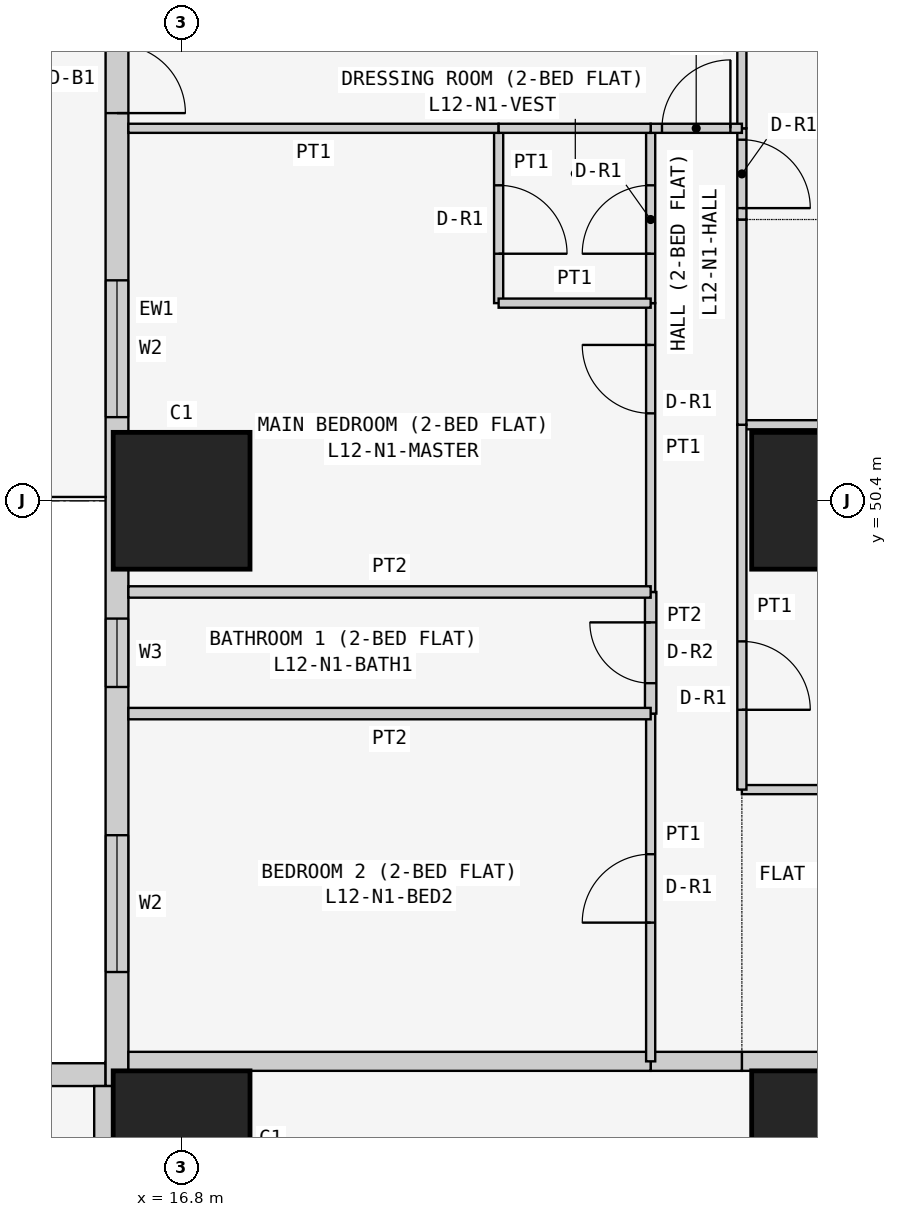
"""IFC4 building model, lengths in metres.
Left out: names, types, materials, properties, quantities, classifications, styles, units other than length and angle.
Written with IfcOpenShell. Run it as: python <this file> out.ifc"""

import sys

from ifc_helpers import new_model, si_unit, direction, frame, frame_2d, origin, origin_2d, place, context, subcontext, project, spatial, rectangle, extrude, element, fill, save


model = new_model("IFC4")
c1 = context("Model", 3, precision=1e-05, world=origin(), true_north=direction((0.0, 1.0)))
c2 = subcontext(c1, "Body", "Model", "MODEL_VIEW")
j1 = project(units=[si_unit("LENGTHUNIT", "METRE"), si_unit("PLANEANGLEUNIT", "RADIAN")], contexts=[c1])
p1 = place(None, origin())
s1 = spatial("IfcSite", under=j1, at=p1, CompositionType="ELEMENT")
p2 = place(p1, origin())
s2 = spatial("IfcBuilding", under=s1, at=p2, CompositionType="ELEMENT")
p3 = place(p2, frame((0.0, 0.0, 52.5)))
s3 = spatial("IfcBuildingStorey", under=s2, at=p3, CompositionType="ELEMENT", Elevation=52.5)
for number, where, z_axis, x_axis in (
    (1, (16.8, 42.0, 0.0), (0.0, 0.0, 1.0), (1.0, 0.0, 0.0)),
    (2, (16.8, 50.4, 0.0), (0.0, 0.0, 1.0), (1.0, 0.0, 0.0)),
    (3, (25.2, 42.0, 0.0), (0.0, 0.0, 1.0), (1.0, 0.0, 0.0)),
    (4, (25.2, 50.4, 0.0), (0.0, 0.0, 1.0), (1.0, 0.0, 0.0)),
):
    element("IfcColumn", number, at=place(p3, frame(where, z_axis=z_axis, x_axis=x_axis)), inside=s3, PredefinedType="COLUMN", context=c2, shape_type="SweptSolid", body=[
        extrude(rectangle(XDim=1.8, YDim=1.8, at=origin_2d()), origin(), (0.0, 0.0, 1.0), 3.6),
    ])
p4 = place(p3, frame((15.8, 42.85, 0.0), z_axis=(0.0, 0.0, 1.0), x_axis=(-1.0, 0.0, 0.0)))
e5 = element("IfcWall", 5, at=p4, inside=s3, PredefinedType="SOLIDWALL", context=c2, shape_type="SweptSolid", body=[
    extrude(rectangle(XDim=15.4, YDim=0.3, at=frame_2d((7.7, 0.0))), origin(), (0.0, 0.0, 1.0), 3.45),
])
p5 = place(p4, frame((1.2, 0.0, 0.9)))
e6 = element("IfcOpeningElement", 6, at=p5, cuts=e5, PredefinedType="OPENING", context=c2, shape_type="SweptSolid", body=[
    extrude(rectangle(XDim=1.8, YDim=1.5, at=frame_2d((0.9, 0.75))), frame((0.0, 0.16, 0.0), z_axis=(0.0, -1.0, 0.0), x_axis=(1.0, 0.0, 0.0)), (0.0, 0.0, 1.0), 0.32),
])
p6 = place(p4, frame((4.95, 0.0, 1.5)))
e7 = element("IfcOpeningElement", 7, at=p6, cuts=e5, PredefinedType="OPENING", context=c2, shape_type="SweptSolid", body=[
    extrude(rectangle(XDim=0.9, YDim=0.7, at=frame_2d((0.45, 0.35))), frame((0.0, 0.16, 0.0), z_axis=(0.0, -1.0, 0.0), x_axis=(1.0, 0.0, 0.0)), (0.0, 0.0, 1.0), 0.32),
])
p7 = place(p4, frame((8.5, 0.0, 0.9)))
e8 = element("IfcOpeningElement", 8, at=p7, cuts=e5, PredefinedType="OPENING", context=c2, shape_type="SweptSolid", body=[
    extrude(rectangle(XDim=1.8, YDim=1.5, at=frame_2d((0.9, 0.75))), frame((0.0, 0.16, 0.0), z_axis=(0.0, -1.0, 0.0), x_axis=(1.0, 0.0, 0.0)), (0.0, 0.0, 1.0), 0.32),
])
p8 = place(p4, frame((12.5, 0.0, 0.0)))
e9 = element("IfcOpeningElement", 9, at=p8, cuts=e5, PredefinedType="OPENING", context=c2, shape_type="SweptSolid", body=[
    extrude(rectangle(XDim=0.9, YDim=2.4, at=frame_2d((0.45, 1.2))), frame((0.0, 0.16, 0.0), z_axis=(0.0, -1.0, 0.0), x_axis=(1.0, 0.0, 0.0)), (0.0, 0.0, 1.0), 0.32),
])
p9 = place(p4, frame((13.5, 0.0, 0.9)))
e10 = element("IfcOpeningElement", 10, at=p9, cuts=e5, PredefinedType="OPENING", context=c2, shape_type="SweptSolid", body=[
    extrude(rectangle(XDim=1.2, YDim=1.5, at=frame_2d((0.6, 0.75))), frame((0.0, 0.16, 0.0), z_axis=(0.0, -1.0, 0.0), x_axis=(1.0, 0.0, 0.0)), (0.0, 0.0, 1.0), 0.32),
])
p10 = place(p3, frame((15.95, 58.4, 0.0), z_axis=(0.0, 0.0, 1.0), x_axis=(0.0, -1.0, 0.0)))
e11 = element("IfcWall", 11, at=p10, inside=s3, PredefinedType="SOLIDWALL", context=c2, shape_type="SweptSolid", body=[
    extrude(rectangle(XDim=15.7, YDim=0.3, at=frame_2d((7.85, 0.0))), origin(), (0.0, 0.0, 1.0), 3.45),
])
p11 = place(p10, frame((12.4, 0.0, 0.9)))
e12 = element("IfcOpeningElement", 12, at=p11, cuts=e11, PredefinedType="OPENING", context=c2, shape_type="SweptSolid", body=[
    extrude(rectangle(XDim=1.8, YDim=1.5, at=frame_2d((0.9, 0.75))), frame((0.0, 0.16, 0.0), z_axis=(0.0, -1.0, 0.0), x_axis=(1.0, 0.0, 0.0)), (0.0, 0.0, 1.0), 0.32),
])
p12 = place(p10, frame((9.55, 0.0, 1.5)))
e13 = element("IfcOpeningElement", 13, at=p12, cuts=e11, PredefinedType="OPENING", context=c2, shape_type="SweptSolid", body=[
    extrude(rectangle(XDim=0.9, YDim=0.7, at=frame_2d((0.45, 0.35))), frame((0.0, 0.16, 0.0), z_axis=(0.0, -1.0, 0.0), x_axis=(1.0, 0.0, 0.0)), (0.0, 0.0, 1.0), 0.32),
])
p13 = place(p10, frame((5.1, 0.0, 0.9)))
e14 = element("IfcOpeningElement", 14, at=p13, cuts=e11, PredefinedType="OPENING", context=c2, shape_type="SweptSolid", body=[
    extrude(rectangle(XDim=1.8, YDim=1.5, at=frame_2d((0.9, 0.75))), frame((0.0, 0.16, 0.0), z_axis=(0.0, -1.0, 0.0), x_axis=(1.0, 0.0, 0.0)), (0.0, 0.0, 1.0), 0.32),
])
p14 = place(p10, frame((2.0, 0.0, 0.0)))
e15 = element("IfcOpeningElement", 15, at=p14, cuts=e11, PredefinedType="OPENING", context=c2, shape_type="SweptSolid", body=[
    extrude(rectangle(XDim=0.9, YDim=2.4, at=frame_2d((0.45, 1.2))), frame((0.0, 0.16, 0.0), z_axis=(0.0, -1.0, 0.0), x_axis=(1.0, 0.0, 0.0)), (0.0, 0.0, 1.0), 0.32),
])
p15 = place(p10, frame((0.7, 0.0, 0.9)))
e16 = element("IfcOpeningElement", 16, at=p15, cuts=e11, PredefinedType="OPENING", context=c2, shape_type="SweptSolid", body=[
    extrude(rectangle(XDim=1.2, YDim=1.5, at=frame_2d((0.6, 0.75))), frame((0.0, 0.16, 0.0), z_axis=(0.0, -1.0, 0.0), x_axis=(1.0, 0.0, 0.0)), (0.0, 0.0, 1.0), 0.32),
])
p16 = place(p3, frame((24.171, 43.025, 0.0), z_axis=(0.0, 0.0, 1.0), x_axis=(1.0, 0.0, 0.0)))
e17 = element("IfcWall", 17, at=p16, inside=s3, PredefinedType="PARTITIONING", context=c2, shape_type="SweptSolid", body=[
    extrude(rectangle(XDim=5.229, YDim=0.25, at=frame_2d((2.615, 0.0))), origin(), (0.0, 0.0, 1.0), 3.45),
])
p17 = place(p16, frame((2.129, 0.0, 0.0)))
e18 = element("IfcOpeningElement", 18, at=p17, cuts=e17, PredefinedType="OPENING", context=c2, shape_type="SweptSolid", body=[
    extrude(rectangle(XDim=1.0, YDim=2.1, at=frame_2d((0.5, 1.05))), frame((0.0, 0.135, 0.0), z_axis=(0.0, -1.0, 0.0), x_axis=(1.0, 0.0, 0.0)), (0.0, 0.0, 1.0), 0.27),
])
p18 = place(p3, frame((22.971, 43.025, 0.0), z_axis=(0.0, 0.0, 1.0), x_axis=(1.0, 0.0, 0.0)))
e19 = element("IfcWall", 19, at=p18, inside=s3, PredefinedType="PARTITIONING", context=c2, shape_type="SweptSolid", body=[
    extrude(rectangle(XDim=1.2, YDim=0.25, at=frame_2d((0.6, 0.0))), origin(), (0.0, 0.0, 1.0), 3.45),
])
for number, where, z_axis, x_axis in (
    (20, (16.1, 43.025, 0.0), (0.0, 0.0, 1.0), (1.0, 0.0, 0.0)),
    (21, (15.775, 35.829, 0.0), (0.0, 0.0, 1.0), (0.0, 1.0, 0.0)),
):
    element("IfcWall", number, at=place(p3, frame(where, z_axis=z_axis, x_axis=x_axis)), inside=s3, PredefinedType="PARTITIONING", context=c2, shape_type="SweptSolid", body=[
        extrude(rectangle(XDim=6.871, YDim=0.25, at=frame_2d((3.436, 0.0))), origin(), (0.0, 0.0, 1.0), 3.45),
    ])
for number, where, z_axis, x_axis in (
    (22, (29.4, 46.6, 0.0), (0.0, 0.0, 1.0), (-1.0, 0.0, 0.0)),
    (23, (29.4, 51.4, 0.0), (0.0, 0.0, 1.0), (-1.0, 0.0, 0.0)),
):
    element("IfcWall", number, at=place(p3, frame(where, z_axis=z_axis, x_axis=x_axis)), inside=s3, PredefinedType="PARTITIONING", context=c2, shape_type="SweptSolid", body=[
        extrude(rectangle(XDim=5.229, YDim=0.12, at=frame_2d((2.615, 0.0))), origin(), (0.0, 0.0, 1.0), 3.45),
    ])
p19 = place(p3, frame((24.171, 51.4, 0.0), z_axis=(0.0, 0.0, 1.0), x_axis=(0.0, -1.0, 0.0)))
e24 = element("IfcWall", 24, at=p19, inside=s3, PredefinedType="PARTITIONING", context=c2, shape_type="SweptSolid", body=[
    extrude(rectangle(XDim=4.8, YDim=0.12, at=frame_2d((2.4, 0.0))), origin(), (0.0, 0.0, 1.0), 3.45),
])
p20 = place(p19, frame((2.85, 0.0, 0.0)))
e25 = element("IfcOpeningElement", 25, at=p20, cuts=e24, PredefinedType="OPENING", context=c2, shape_type="SweptSolid", body=[
    extrude(rectangle(XDim=0.9, YDim=2.1, at=frame_2d((0.45, 1.05))), frame((0.0, 0.07, 0.0), z_axis=(0.0, -1.0, 0.0), x_axis=(1.0, 0.0, 0.0)), (0.0, 0.0, 1.0), 0.14),
])
p21 = place(p3, frame((24.171, 54.1, 0.0), z_axis=(0.0, 0.0, 1.0), x_axis=(0.0, -1.0, 0.0)))
e26 = element("IfcWall", 26, at=p21, inside=s3, PredefinedType="PARTITIONING", context=c2, shape_type="SweptSolid", body=[
    extrude(rectangle(XDim=2.7, YDim=0.12, at=frame_2d((1.35, 0.0))), origin(), (0.0, 0.0, 1.0), 3.45),
])
p22 = place(p3, frame((24.171, 55.3, 0.0), z_axis=(0.0, 0.0, 1.0), x_axis=(0.0, -1.0, 0.0)))
e27 = element("IfcWall", 27, at=p22, inside=s3, PredefinedType="PARTITIONING", context=c2, shape_type="SweptSolid", body=[
    extrude(rectangle(XDim=1.2, YDim=0.12, at=frame_2d((0.6, 0.0))), origin(), (0.0, 0.0, 1.0), 3.45),
])
p23 = place(p22, frame((0.15, 0.0, 0.0)))
e28 = element("IfcOpeningElement", 28, at=p23, cuts=e27, PredefinedType="OPENING", context=c2, shape_type="SweptSolid", body=[
    extrude(rectangle(XDim=0.9, YDim=2.1, at=frame_2d((0.45, 1.05))), frame((0.0, 0.07, 0.0), z_axis=(0.0, -1.0, 0.0), x_axis=(1.0, 0.0, 0.0)), (0.0, 0.0, 1.0), 0.14),
])
p24 = place(p3, frame((24.171, 59.45, 0.0), z_axis=(0.0, 0.0, 1.0), x_axis=(0.0, -1.0, 0.0)))
e29 = element("IfcWall", 29, at=p24, inside=s3, PredefinedType="PARTITIONING", context=c2, shape_type="SweptSolid", body=[
    extrude(rectangle(XDim=4.15, YDim=0.12, at=frame_2d((2.075, 0.0))), origin(), (0.0, 0.0, 1.0), 3.45),
])
p25 = place(p3, frame((22.971, 47.6, 0.0), z_axis=(0.0, 0.0, 1.0), x_axis=(0.0, -1.0, 0.0)))
e30 = element("IfcWall", 30, at=p25, inside=s3, PredefinedType="PARTITIONING", context=c2, shape_type="SweptSolid", body=[
    extrude(rectangle(XDim=4.575, YDim=0.12, at=frame_2d((2.288, 0.0))), origin(), (0.0, 0.0, 1.0), 3.45),
])
p26 = place(p25, frame((1.85, 0.0, 0.0)))
e31 = element("IfcOpeningElement", 31, at=p26, cuts=e30, PredefinedType="OPENING", context=c2, shape_type="SweptSolid", body=[
    extrude(rectangle(XDim=0.9, YDim=2.1, at=frame_2d((0.45, 1.05))), frame((0.0, 0.07, 0.0), z_axis=(0.0, -1.0, 0.0), x_axis=(1.0, 0.0, 0.0)), (0.0, 0.0, 1.0), 0.14),
])
p27 = place(p3, frame((22.971, 49.2, 0.0), z_axis=(0.0, 0.0, 1.0), x_axis=(0.0, -1.0, 0.0)))
e32 = element("IfcWall", 32, at=p27, inside=s3, PredefinedType="PARTITIONING", context=c2, shape_type="SweptSolid", body=[
    extrude(rectangle(XDim=1.6, YDim=0.15, at=frame_2d((0.8, 0.0))), origin(), (0.0, 0.0, 1.0), 3.45),
])
p28 = place(p27, frame((0.4, 0.0, 0.0)))
e33 = element("IfcOpeningElement", 33, at=p28, cuts=e32, PredefinedType="OPENING", context=c2, shape_type="SweptSolid", body=[
    extrude(rectangle(XDim=0.8, YDim=2.1, at=frame_2d((0.4, 1.05))), frame((0.0, 0.085, 0.0), z_axis=(0.0, -1.0, 0.0), x_axis=(1.0, 0.0, 0.0)), (0.0, 0.0, 1.0), 0.17),
])
p29 = place(p3, frame((22.971, 53.0, 0.0), z_axis=(0.0, 0.0, 1.0), x_axis=(0.0, -1.0, 0.0)))
e34 = element("IfcWall", 34, at=p29, inside=s3, PredefinedType="PARTITIONING", context=c2, shape_type="SweptSolid", body=[
    extrude(rectangle(XDim=3.8, YDim=0.12, at=frame_2d((1.9, 0.0))), origin(), (0.0, 0.0, 1.0), 3.45),
])
p30 = place(p29, frame((0.55, 0.0, 0.0)))
e35 = element("IfcOpeningElement", 35, at=p30, cuts=e34, PredefinedType="OPENING", context=c2, shape_type="SweptSolid", body=[
    extrude(rectangle(XDim=0.9, YDim=2.1, at=frame_2d((0.45, 1.05))), frame((0.0, 0.07, 0.0), z_axis=(0.0, -1.0, 0.0), x_axis=(1.0, 0.0, 0.0)), (0.0, 0.0, 1.0), 0.14),
])
p31 = place(p3, frame((22.971, 55.3, 0.0), z_axis=(0.0, 0.0, 1.0), x_axis=(0.0, -1.0, 0.0)))
e36 = element("IfcWall", 36, at=p31, inside=s3, PredefinedType="PARTITIONING", context=c2, shape_type="SweptSolid", body=[
    extrude(rectangle(XDim=2.3, YDim=0.12, at=frame_2d((1.15, 0.0))), origin(), (0.0, 0.0, 1.0), 3.45),
])
p32 = place(p31, frame((0.75, 0.0, 0.0)))
e37 = element("IfcOpeningElement", 37, at=p32, cuts=e36, PredefinedType="OPENING", context=c2, shape_type="SweptSolid", body=[
    extrude(rectangle(XDim=0.9, YDim=2.1, at=frame_2d((0.45, 1.05))), frame((0.0, 0.07, 0.0), z_axis=(0.0, -1.0, 0.0), x_axis=(1.0, 0.0, 0.0)), (0.0, 0.0, 1.0), 0.14),
])
p33 = place(p3, frame((24.171, 55.3, 0.0), z_axis=(0.0, 0.0, 1.0), x_axis=(-1.0, 0.0, 0.0)))
e38 = element("IfcWall", 38, at=p33, inside=s3, PredefinedType="PARTITIONING", context=c2, shape_type="SweptSolid", body=[
    extrude(rectangle(XDim=1.2, YDim=0.12, at=frame_2d((0.6, 0.0))), origin(), (0.0, 0.0, 1.0), 3.45),
])
p34 = place(p33, frame((0.151, 0.0, 0.0)))
e39 = element("IfcOpeningElement", 39, at=p34, cuts=e38, PredefinedType="OPENING", context=c2, shape_type="SweptSolid", body=[
    extrude(rectangle(XDim=0.9, YDim=2.1, at=frame_2d((0.45, 1.05))), frame((0.0, 0.07, 0.0), z_axis=(0.0, -1.0, 0.0), x_axis=(1.0, 0.0, 0.0)), (0.0, 0.0, 1.0), 0.14),
])
for number, where, z_axis, x_axis in (
    (40, (22.971, 47.6, 0.0), (0.0, 0.0, 1.0), (-1.0, 0.0, 0.0)),
    (41, (22.971, 49.2, 0.0), (0.0, 0.0, 1.0), (-1.0, 0.0, 0.0)),
):
    element("IfcWall", number, at=place(p3, frame(where, z_axis=z_axis, x_axis=x_axis)), inside=s3, PredefinedType="PARTITIONING", context=c2, shape_type="SweptSolid", body=[
        extrude(rectangle(XDim=6.871, YDim=0.15, at=frame_2d((3.436, 0.0))), origin(), (0.0, 0.0, 1.0), 3.45),
    ])
p35 = place(p3, frame((20.971, 55.3, 0.0), z_axis=(0.0, 0.0, 1.0), x_axis=(0.0, -1.0, 0.0)))
e42 = element("IfcWall", 42, at=p35, inside=s3, PredefinedType="PARTITIONING", context=c2, shape_type="SweptSolid", body=[
    extrude(rectangle(XDim=2.3, YDim=0.12, at=frame_2d((1.15, 0.0))), origin(), (0.0, 0.0, 1.0), 2.848),
])
p36 = place(p35, frame((0.75, 0.0, 0.0)))
e43 = element("IfcOpeningElement", 43, at=p36, cuts=e42, PredefinedType="OPENING", context=c2, shape_type="SweptSolid", body=[
    extrude(rectangle(XDim=0.9, YDim=2.1, at=frame_2d((0.45, 1.05))), frame((0.0, 0.07, 0.0), z_axis=(0.0, -1.0, 0.0), x_axis=(1.0, 0.0, 0.0)), (0.0, 0.0, 1.0), 0.14),
])
p37 = place(p3, frame((20.971, 53.0, 0.0), z_axis=(0.0, 0.0, 1.0), x_axis=(1.0, 0.0, 0.0)))
e44 = element("IfcWall", 44, at=p37, inside=s3, PredefinedType="PARTITIONING", context=c2, shape_type="SweptSolid", body=[
    extrude(rectangle(XDim=2.0, YDim=0.12, at=frame_2d((1.0, 0.0))), origin(), (0.0, 0.0, 1.0), 3.45),
])
p38 = place(p3, frame((16.1, 55.3, 0.0), z_axis=(0.0, 0.0, 1.0), x_axis=(1.0, 0.0, 0.0)))
e45 = element("IfcWall", 45, at=p38, inside=s3, PredefinedType="PARTITIONING", context=c2, shape_type="SweptSolid", body=[
    extrude(rectangle(XDim=4.871, YDim=0.12, at=frame_2d((2.436, 0.0))), origin(), (0.0, 0.0, 1.0), 3.45),
])
p39 = place(p3, frame((22.971, 55.3, 0.0), z_axis=(0.0, 0.0, 1.0), x_axis=(-1.0, 0.0, 0.0)))
e46 = element("IfcWall", 46, at=p39, inside=s3, PredefinedType="PARTITIONING", context=c2, shape_type="SweptSolid", body=[
    extrude(rectangle(XDim=2.0, YDim=0.12, at=frame_2d((1.0, 0.0))), origin(), (0.0, 0.0, 1.0), 3.45),
])
p40 = place(p11, origin())
e47 = element("IfcWindow", 47, at=p40, inside=s3, PartitioningType="SINGLE_PANEL", PredefinedType="WINDOW", context=c2, shape_type="SweptSolid", body=[
    extrude(rectangle(XDim=1.8, YDim=1.5, at=frame_2d((0.9, 0.75))), frame((0.0, 0.03, 0.0), z_axis=(0.0, -1.0, 0.0), x_axis=(1.0, 0.0, 0.0)), (0.0, 0.0, 1.0), 0.06),
])
fill(e12, e47)
p41 = place(p12, origin())
e48 = element("IfcWindow", 48, at=p41, inside=s3, PartitioningType="SINGLE_PANEL", PredefinedType="WINDOW", context=c2, shape_type="SweptSolid", body=[
    extrude(rectangle(XDim=0.9, YDim=0.7, at=frame_2d((0.45, 0.35))), frame((0.0, 0.03, 0.0), z_axis=(0.0, -1.0, 0.0), x_axis=(1.0, 0.0, 0.0)), (0.0, 0.0, 1.0), 0.06),
])
fill(e13, e48)
p42 = place(p13, origin())
e49 = element("IfcWindow", 49, at=p42, inside=s3, PartitioningType="SINGLE_PANEL", PredefinedType="WINDOW", context=c2, shape_type="SweptSolid", body=[
    extrude(rectangle(XDim=1.8, YDim=1.5, at=frame_2d((0.9, 0.75))), frame((0.0, 0.03, 0.0), z_axis=(0.0, -1.0, 0.0), x_axis=(1.0, 0.0, 0.0)), (0.0, 0.0, 1.0), 0.06),
])
fill(e14, e49)
p43 = place(p14, origin())
e50 = element("IfcDoor", 50, at=p43, inside=s3, OperationType="SINGLE_SWING_RIGHT", PredefinedType="DOOR", context=c2, shape_type="SweptSolid", body=[
    extrude(rectangle(XDim=0.9, YDim=2.4, at=frame_2d((0.45, 1.2))), frame((0.0, 0.025, 0.0), z_axis=(0.0, -1.0, 0.0), x_axis=(1.0, 0.0, 0.0)), (0.0, 0.0, 1.0), 0.05),
])
fill(e15, e50)
p44 = place(p20, origin())
e51 = element("IfcDoor", 51, at=p44, inside=s3, OperationType="SINGLE_SWING_RIGHT", PredefinedType="DOOR", context=c2, shape_type="SweptSolid", body=[
    extrude(rectangle(XDim=0.9, YDim=2.1, at=frame_2d((0.45, 1.05))), frame((0.0, 0.025, 0.0), z_axis=(0.0, -1.0, 0.0), x_axis=(1.0, 0.0, 0.0)), (0.0, 0.0, 1.0), 0.05),
])
fill(e25, e51)
p45 = place(p23, origin())
e52 = element("IfcDoor", 52, at=p45, inside=s3, OperationType="SINGLE_SWING_RIGHT", PredefinedType="DOOR", context=c2, shape_type="SweptSolid", body=[
    extrude(rectangle(XDim=0.9, YDim=2.1, at=frame_2d((0.45, 1.05))), frame((0.0, 0.025, 0.0), z_axis=(0.0, -1.0, 0.0), x_axis=(1.0, 0.0, 0.0)), (0.0, 0.0, 1.0), 0.05),
])
fill(e28, e52)
p46 = place(p26, frame((0.9, 0.0, 0.0), z_axis=(0.0, 0.0, 1.0), x_axis=(-1.0, 0.0, 0.0)))
e53 = element("IfcDoor", 53, at=p46, inside=s3, OperationType="SINGLE_SWING_LEFT", PredefinedType="DOOR", context=c2, shape_type="SweptSolid", body=[
    extrude(rectangle(XDim=0.9, YDim=2.1, at=frame_2d((0.45, 1.05))), frame((0.0, 0.025, 0.0), z_axis=(0.0, -1.0, 0.0), x_axis=(1.0, 0.0, 0.0)), (0.0, 0.0, 1.0), 0.05),
])
fill(e31, e53)
p47 = place(p28, frame((0.8, 0.0, 0.0), z_axis=(0.0, 0.0, 1.0), x_axis=(-1.0, 0.0, 0.0)))
e54 = element("IfcDoor", 54, at=p47, inside=s3, OperationType="SINGLE_SWING_RIGHT", PredefinedType="DOOR", context=c2, shape_type="SweptSolid", body=[
    extrude(rectangle(XDim=0.8, YDim=2.1, at=frame_2d((0.4, 1.05))), frame((0.0, 0.025, 0.0), z_axis=(0.0, -1.0, 0.0), x_axis=(1.0, 0.0, 0.0)), (0.0, 0.0, 1.0), 0.05),
])
fill(e33, e54)
p48 = place(p30, frame((0.9, 0.0, 0.0), z_axis=(0.0, 0.0, 1.0), x_axis=(-1.0, 0.0, 0.0)))
e55 = element("IfcDoor", 55, at=p48, inside=s3, OperationType="SINGLE_SWING_RIGHT", PredefinedType="DOOR", context=c2, shape_type="SweptSolid", body=[
    extrude(rectangle(XDim=0.9, YDim=2.1, at=frame_2d((0.45, 1.05))), frame((0.0, 0.025, 0.0), z_axis=(0.0, -1.0, 0.0), x_axis=(1.0, 0.0, 0.0)), (0.0, 0.0, 1.0), 0.05),
])
fill(e35, e55)
p49 = place(p32, frame((0.9, 0.0, 0.0), z_axis=(0.0, 0.0, 1.0), x_axis=(-1.0, 0.0, 0.0)))
e56 = element("IfcDoor", 56, at=p49, inside=s3, OperationType="SINGLE_SWING_LEFT", PredefinedType="DOOR", context=c2, shape_type="SweptSolid", body=[
    extrude(rectangle(XDim=0.9, YDim=2.1, at=frame_2d((0.45, 1.05))), frame((0.0, 0.025, 0.0), z_axis=(0.0, -1.0, 0.0), x_axis=(1.0, 0.0, 0.0)), (0.0, 0.0, 1.0), 0.05),
])
fill(e37, e56)
p50 = place(p36, origin())
e57 = element("IfcDoor", 57, at=p50, inside=s3, OperationType="SINGLE_SWING_RIGHT", PredefinedType="DOOR", context=c2, shape_type="SweptSolid", body=[
    extrude(rectangle(XDim=0.9, YDim=2.1, at=frame_2d((0.45, 1.05))), frame((0.0, 0.025, 0.0), z_axis=(0.0, -1.0, 0.0), x_axis=(1.0, 0.0, 0.0)), (0.0, 0.0, 1.0), 0.05),
])
fill(e43, e57)
p51 = place(p34, frame((0.9, 0.0, 0.0), z_axis=(0.0, 0.0, 1.0), x_axis=(-1.0, 0.0, 0.0)))
e58 = element("IfcDoor", 58, at=p51, inside=s3, OperationType="SINGLE_SWING_RIGHT", PredefinedType="DOOR", context=c2, shape_type="SweptSolid", body=[
    extrude(rectangle(XDim=0.9, YDim=2.1, at=frame_2d((0.45, 1.05))), frame((0.0, 0.025, 0.0), z_axis=(0.0, -1.0, 0.0), x_axis=(1.0, 0.0, 0.0)), (0.0, 0.0, 1.0), 0.05),
])
fill(e39, e58)
save(model, sys.argv[1])
